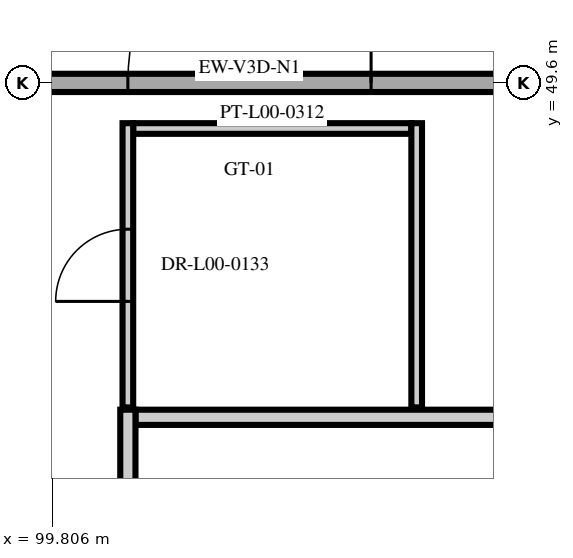
"""IFC4 building model, lengths in metres.
Left out: names, types, materials, properties, quantities, classifications, styles, units other than length and angle.
Written with IfcOpenShell. Run it as: python <this file> out.ifc"""

import sys

from ifc_helpers import new_model, si_unit, direction, frame, frame_2d, origin, place, context, subcontext, project, spatial, rectangle, extrude, element, fill, save


model = new_model("IFC4")
c1 = context("Model", 3, precision=1e-05, world=origin(), true_north=direction((0.0, 1.0)))
c2 = subcontext(c1, "Body", "Model", "MODEL_VIEW")
j1 = project(units=[si_unit("LENGTHUNIT", "METRE"), si_unit("PLANEANGLEUNIT", "RADIAN")], contexts=[c1])
p1 = place(None, origin())
s1 = spatial("IfcSite", under=j1, at=p1, CompositionType="ELEMENT")
p2 = place(p1, origin())
s2 = spatial("IfcBuilding", under=s1, at=p2, CompositionType="ELEMENT")
p3 = place(p2, origin())
s3 = spatial("IfcBuildingStorey", under=s2, at=p3, CompositionType="ELEMENT", Elevation=0.0)
p4 = place(p3, frame((97.515, 49.6, 0.0), z_axis=(0.0, 0.0, 1.0), x_axis=(1.0, 0.0, 0.0)))
e1 = element("IfcWall", 1, at=p4, inside=s3, PredefinedType="SOLIDWALL", context=c2, shape_type="SweptSolid", body=[
    extrude(rectangle(XDim=9.77, YDim=0.24, at=frame_2d((4.885, 0.0))), origin(), (0.0, 0.0, 1.0), 3.805),
])
p5 = place(p4, frame((3.285, 0.0, 0.0)))
e2 = element("IfcOpeningElement", 2, at=p5, cuts=e1, PredefinedType="OPENING", context=c2, shape_type="SweptSolid", body=[
    extrude(rectangle(XDim=3.2, YDim=3.0, at=frame_2d((1.6, 1.5))), frame((0.0, 0.13, 0.0), z_axis=(0.0, -1.0, 0.0), x_axis=(1.0, 0.0, 0.0)), (0.0, 0.0, 1.0), 0.26),
])
p6 = place(p3, frame((100.9, 45.2, 0.0), z_axis=(0.0, 0.0, 1.0), x_axis=(1.0, 0.0, 0.0)))
e3 = element("IfcWall", 3, at=p6, inside=s3, PredefinedType="PARTITIONING", context=c2, shape_type="SweptSolid", body=[
    extrude(rectangle(XDim=15.8, YDim=0.2, at=frame_2d((7.9, 0.0))), origin(), (0.0, 0.0, 1.0), 4.552),
])
p7 = place(p3, frame((100.8, 36.1, 0.0), z_axis=(0.0, 0.0, 1.0), x_axis=(0.0, 1.0, 0.0)))
e4 = element("IfcWall", 4, at=p7, inside=s3, PredefinedType="PARTITIONING", context=c2, shape_type="SweptSolid", body=[
    extrude(rectangle(XDim=9.2, YDim=0.2, at=frame_2d((4.6, 0.0))), origin(), (0.0, 0.0, 1.0), 4.5),
])
p8 = place(p7, frame((3.8, 0.0, 0.0)))
e5 = element("IfcOpeningElement", 5, at=p8, cuts=e4, PredefinedType="OPENING", context=c2, shape_type="SweptSolid", body=[
    extrude(rectangle(XDim=1.6, YDim=2.25, at=frame_2d((0.8, 1.125))), frame((0.0, 0.11, 0.0), z_axis=(0.0, -1.0, 0.0), x_axis=(1.0, 0.0, 0.0)), (0.0, 0.0, 1.0), 0.22),
])
p9 = place(p3, frame((100.87, 49.0, 0.0), z_axis=(0.0, 0.0, 1.0), x_axis=(1.0, 0.0, 0.0)))
e6 = element("IfcWall", 6, at=p9, inside=s3, PredefinedType="PARTITIONING", context=c2, shape_type="SweptSolid", body=[
    extrude(rectangle(XDim=3.66, YDim=0.14, at=frame_2d((1.83, 0.0))), origin(), (0.0, 0.0, 1.0), 4.604),
])
p10 = place(p3, frame((100.8, 45.33, 0.0), z_axis=(0.0, 0.0, 1.0), x_axis=(0.0, 1.0, 0.0)))
e7 = element("IfcWall", 7, at=p10, inside=s3, PredefinedType="PARTITIONING", context=c2, shape_type="SweptSolid", body=[
    extrude(rectangle(XDim=3.74, YDim=0.14, at=frame_2d((1.87, 0.0))), origin(), (0.0, 0.0, 1.0), 4.604),
])
p11 = place(p10, frame((1.395, 0.0, 0.0)))
e8 = element("IfcOpeningElement", 8, at=p11, cuts=e7, PredefinedType="OPENING", context=c2, shape_type="SweptSolid", body=[
    extrude(rectangle(XDim=0.95, YDim=2.1, at=frame_2d((0.475, 1.05))), frame((0.0, 0.08, 0.0), z_axis=(0.0, -1.0, 0.0), x_axis=(1.0, 0.0, 0.0)), (0.0, 0.0, 1.0), 0.16),
])
p12 = place(p3, frame((104.6, 45.33, 0.0), z_axis=(0.0, 0.0, 1.0), x_axis=(0.0, 1.0, 0.0)))
e9 = element("IfcWall", 9, at=p12, inside=s3, PredefinedType="PARTITIONING", context=c2, shape_type="SweptSolid", body=[
    extrude(rectangle(XDim=3.74, YDim=0.14, at=frame_2d((1.87, 0.0))), origin(), (0.0, 0.0, 1.0), 4.88),
])
p13 = place(p5, origin())
e10 = element("IfcDoor", 10, at=p13, inside=s3, OperationType="ROLLINGUP", PredefinedType="GATE", context=c2, shape_type="SweptSolid", body=[
    extrude(rectangle(XDim=3.2, YDim=3.0, at=frame_2d((1.6, 1.5))), frame((0.0, 0.025, 0.0), z_axis=(0.0, -1.0, 0.0), x_axis=(1.0, 0.0, 0.0)), (0.0, 0.0, 1.0), 0.05),
])
fill(e2, e10)
p14 = place(p11, origin())
e11 = element("IfcDoor", 11, at=p14, inside=s3, OperationType="SINGLE_SWING_LEFT", PredefinedType="DOOR", context=c2, shape_type="SweptSolid", body=[
    extrude(rectangle(XDim=0.95, YDim=2.1, at=frame_2d((0.475, 1.05))), frame((0.0, 0.025, 0.0), z_axis=(0.0, -1.0, 0.0), x_axis=(1.0, 0.0, 0.0)), (0.0, 0.0, 1.0), 0.05),
])
fill(e8, e11)
save(model, sys.argv[1])
